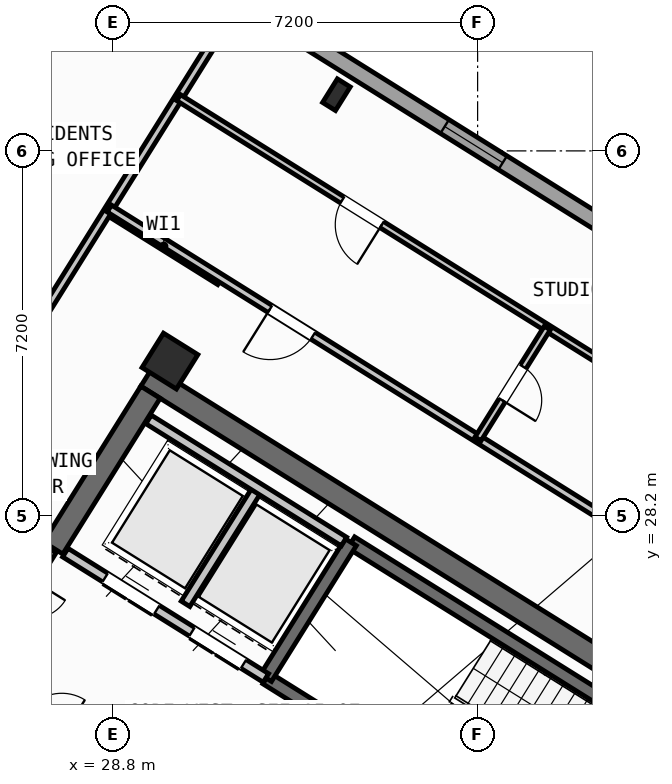
"""IFC4 building model, lengths in metres.
Left out: names, types, materials, properties, quantities, classifications, styles, units other than length and angle.
Written with IfcOpenShell. Run it as: python <this file> out.ifc"""

import sys

from ifc_helpers import new_model, si_unit, direction, frame, frame_2d, origin, origin_2d, place, context, subcontext, project, spatial, rectangle, hollow_rectangle, i_section, extrude, source, transform, mapped, element, fill, save


model = new_model("IFC4")
c1 = context("Model", 3, precision=1e-05, world=origin(), true_north=direction((0.0, 1.0)))
c2 = subcontext(c1, "Body", "Model", "MODEL_VIEW")
j1 = project(units=[si_unit("LENGTHUNIT", "METRE"), si_unit("PLANEANGLEUNIT", "RADIAN")], contexts=[c1])
p1 = place(None, origin())
s1 = spatial("IfcSite", under=j1, at=p1, CompositionType="ELEMENT")
p2 = place(p1, origin())
s2 = spatial("IfcBuilding", under=s1, at=p2, CompositionType="ELEMENT")
p3 = place(p2, frame((0.0, 0.0, 211.2)))
s3 = spatial("IfcBuildingStorey", under=s2, at=p3, CompositionType="ELEMENT", Elevation=211.2)
p4 = place(p3, frame((40.531, 24.036, 0.0), z_axis=(0.0, 0.0, 1.0), x_axis=(-0.848048787466, 0.529918157905, 0.0)))
e1 = element("IfcWall", 1, at=p4, inside=s3, PredefinedType="SHEAR", context=c2, shape_type="SweptSolid", body=[
    extrude(rectangle(XDim=13.04, YDim=0.45, at=frame_2d((6.52, 0.0))), origin(), (0.0, 0.0, 1.0), 3.35),
])
p5 = place(p3, frame((29.544, 30.636, 0.0), z_axis=(0.0, 0.0, 1.0), x_axis=(-0.529902075036, -0.848058836916, 0.0)))
e2 = element("IfcWall", 2, at=p5, inside=s3, PredefinedType="SHEAR", context=c2, shape_type="SweptSolid", body=[
    extrude(rectangle(XDim=3.625, YDim=0.45, at=frame_2d((1.812, 0.0))), origin(), (0.0, 0.0, 1.0), 3.35),
])
m1 = source(origin(), c2, "Body", "SweptSolid", [
    extrude(i_section(OverallWidth=0.3, OverallDepth=0.55, WebThickness=0.015, FlangeThickness=0.029, at=origin_2d()), origin(), (0.0, 0.0, 1.0), 3.6),
])
p6 = place(p3, frame((33.213, 36.509, 0.0), z_axis=(0.0, 0.0, 1.0), x_axis=(-0.848048096156, 0.529919264233, 0.0)))
e3 = element("IfcColumn", 3, at=p6, inside=s3, PredefinedType="COLUMN", context=c2, shape_type="MappedRepresentation", body=[
    mapped(m1, transform((0.0, 0.0, 0.0), scale=1.0)),
])
m2 = source(origin(), c2, "Body", "SweptSolid", [
    extrude(hollow_rectangle(XDim=0.8, YDim=0.8, WallThickness=0.032, at=origin_2d()), origin(), (0.0, 0.0, 1.0), 3.6),
])
p7 = place(p3, frame((29.928, 31.251, 0.0), z_axis=(0.0, 0.0, 1.0), x_axis=(-0.848048096156, 0.529919264233, 0.0)))
e4 = element("IfcColumn", 4, at=p7, inside=s3, PredefinedType="COLUMN", context=c2, shape_type="MappedRepresentation", body=[
    mapped(m2, transform((0.0, 0.0, 0.0), scale=1.0)),
])
p8 = place(p3, frame((31.76, 12.183, 0.0), z_axis=(0.0, 0.0, 1.0), x_axis=(-0.848047074256, 0.529920899612, 0.0)))
e5 = element("IfcWall", 5, at=p8, inside=s3, PredefinedType="STANDARD", context=c2, shape_type="SweptSolid", body=[
    extrude(rectangle(XDim=30.652, YDim=0.32, at=frame_2d((15.326, 0.0))), origin(), (0.0, 0.0, 1.0), 3.35),
])
p9 = place(p8, frame((15.166, 0.0, 0.0)))
e6 = element("IfcOpeningElement", 6, at=p9, cuts=e5, PredefinedType="OPENING", context=c2, shape_type="SweptSolid", body=[
    extrude(rectangle(XDim=1.2, YDim=2.15, at=frame_2d((0.6, 1.075))), frame((0.0, 0.17, 0.0), z_axis=(0.0, -1.0, 0.0), x_axis=(1.0, 0.0, 0.0)), (0.0, 0.0, 1.0), 0.34),
])
p10 = place(p8, frame((2.24, 0.0, 0.9)))
e7 = element("IfcOpeningElement", 7, at=p10, cuts=e5, PredefinedType="OPENING", context=c2, shape_type="SweptSolid", body=[
    extrude(rectangle(XDim=1.65, YDim=1.45, at=frame_2d((0.825, 0.725))), frame((0.0, 0.17, 0.0), z_axis=(0.0, -1.0, 0.0), x_axis=(1.0, 0.0, 0.0)), (0.0, 0.0, 1.0), 0.34),
])
p11 = place(p8, frame((7.469, 0.0, 0.9)))
e8 = element("IfcOpeningElement", 8, at=p11, cuts=e5, PredefinedType="OPENING", context=c2, shape_type="SweptSolid", body=[
    extrude(rectangle(XDim=1.65, YDim=1.45, at=frame_2d((0.825, 0.725))), frame((0.0, 0.17, 0.0), z_axis=(0.0, -1.0, 0.0), x_axis=(1.0, 0.0, 0.0)), (0.0, 0.0, 1.0), 0.34),
])
p12 = place(p8, frame((12.623, 0.0, 1.0)))
e9 = element("IfcOpeningElement", 9, at=p12, cuts=e5, PredefinedType="OPENING", context=c2, shape_type="SweptSolid", body=[
    extrude(rectangle(XDim=0.9, YDim=1.25, at=frame_2d((0.45, 0.625))), frame((0.0, 0.17, 0.0), z_axis=(0.0, -1.0, 0.0), x_axis=(1.0, 0.0, 0.0)), (0.0, 0.0, 1.0), 0.34),
])
p13 = place(p8, frame((19.715, 0.0, 1.0)))
e10 = element("IfcOpeningElement", 10, at=p13, cuts=e5, PredefinedType="OPENING", context=c2, shape_type="SweptSolid", body=[
    extrude(rectangle(XDim=0.9, YDim=1.25, at=frame_2d((0.45, 0.625))), frame((0.0, 0.17, 0.0), z_axis=(0.0, -1.0, 0.0), x_axis=(1.0, 0.0, 0.0)), (0.0, 0.0, 1.0), 0.34),
])
p14 = place(p8, frame((25.566, 0.0, 0.9)))
e11 = element("IfcOpeningElement", 11, at=p14, cuts=e5, PredefinedType="OPENING", context=c2, shape_type="SweptSolid", body=[
    extrude(rectangle(XDim=1.65, YDim=1.45, at=frame_2d((0.825, 0.725))), frame((0.0, 0.17, 0.0), z_axis=(0.0, -1.0, 0.0), x_axis=(1.0, 0.0, 0.0)), (0.0, 0.0, 1.0), 0.34),
])
p15 = place(p8, frame((28.896, 0.0, 1.0)))
e12 = element("IfcOpeningElement", 12, at=p15, cuts=e5, PredefinedType="OPENING", context=c2, shape_type="SweptSolid", body=[
    extrude(rectangle(XDim=0.9, YDim=1.25, at=frame_2d((0.45, 0.625))), frame((0.0, 0.17, 0.0), z_axis=(0.0, -1.0, 0.0), x_axis=(1.0, 0.0, 0.0)), (0.0, 0.0, 1.0), 0.34),
])
p16 = place(p3, frame((17.424, 47.083, 0.0), z_axis=(0.0, 0.0, 1.0), x_axis=(0.848049927979, -0.529916332693, 0.0)))
e13 = element("IfcWall", 13, at=p16, inside=s3, PredefinedType="STANDARD", context=c2, shape_type="SweptSolid", body=[
    extrude(rectangle(XDim=29.223, YDim=0.32, at=frame_2d((14.612, 0.0))), origin(), (0.0, 0.0, 1.0), 3.35),
])
p17 = place(p16, frame((2.526, 0.0, 0.0)))
e14 = element("IfcOpeningElement", 14, at=p17, cuts=e13, PredefinedType="OPENING", context=c2, shape_type="SweptSolid", body=[
    extrude(rectangle(XDim=1.05, YDim=2.15, at=frame_2d((0.525, 1.075))), frame((0.0, 0.17, 0.0), z_axis=(0.0, -1.0, 0.0), x_axis=(1.0, 0.0, 0.0)), (0.0, 0.0, 1.0), 0.34),
])
p18 = place(p16, frame((0.653, 0.0, 0.9)))
e15 = element("IfcOpeningElement", 15, at=p18, cuts=e13, PredefinedType="OPENING", context=c2, shape_type="SweptSolid", body=[
    extrude(rectangle(XDim=1.35, YDim=1.45, at=frame_2d((0.675, 0.725))), frame((0.0, 0.17, 0.0), z_axis=(0.0, -1.0, 0.0), x_axis=(1.0, 0.0, 0.0)), (0.0, 0.0, 1.0), 0.34),
])
p19 = place(p16, frame((6.897, 0.0, 1.0)))
e16 = element("IfcOpeningElement", 16, at=p19, cuts=e13, PredefinedType="OPENING", context=c2, shape_type="SweptSolid", body=[
    extrude(rectangle(XDim=0.9, YDim=1.25, at=frame_2d((0.45, 0.625))), frame((0.0, 0.17, 0.0), z_axis=(0.0, -1.0, 0.0), x_axis=(1.0, 0.0, 0.0)), (0.0, 0.0, 1.0), 0.34),
])
p20 = place(p16, frame((9.602, 0.0, 0.95)))
e17 = element("IfcOpeningElement", 17, at=p20, cuts=e13, PredefinedType="OPENING", context=c2, shape_type="SweptSolid", body=[
    extrude(rectangle(XDim=1.95, YDim=1.35, at=frame_2d((0.975, 0.675))), frame((0.0, 0.17, 0.0), z_axis=(0.0, -1.0, 0.0), x_axis=(1.0, 0.0, 0.0)), (0.0, 0.0, 1.0), 0.34),
])
p21 = place(p16, frame((14.096, 0.0, 1.0)))
e18 = element("IfcOpeningElement", 18, at=p21, cuts=e13, PredefinedType="OPENING", context=c2, shape_type="SweptSolid", body=[
    extrude(rectangle(XDim=0.9, YDim=1.25, at=frame_2d((0.45, 0.625))), frame((0.0, 0.17, 0.0), z_axis=(0.0, -1.0, 0.0), x_axis=(1.0, 0.0, 0.0)), (0.0, 0.0, 1.0), 0.34),
])
p22 = place(p16, frame((17.254, 0.0, 1.0)))
e19 = element("IfcOpeningElement", 19, at=p22, cuts=e13, PredefinedType="OPENING", context=c2, shape_type="SweptSolid", body=[
    extrude(rectangle(XDim=0.9, YDim=1.25, at=frame_2d((0.45, 0.625))), frame((0.0, 0.17, 0.0), z_axis=(0.0, -1.0, 0.0), x_axis=(1.0, 0.0, 0.0)), (0.0, 0.0, 1.0), 0.34),
])
p23 = place(p16, frame((21.139, 0.0, 0.9)))
e20 = element("IfcOpeningElement", 20, at=p23, cuts=e13, PredefinedType="OPENING", context=c2, shape_type="SweptSolid", body=[
    extrude(rectangle(XDim=1.35, YDim=1.45, at=frame_2d((0.675, 0.725))), frame((0.0, 0.17, 0.0), z_axis=(0.0, -1.0, 0.0), x_axis=(1.0, 0.0, 0.0)), (0.0, 0.0, 1.0), 0.34),
])
p24 = place(p16, frame((25.778, 0.0, 0.9)))
e21 = element("IfcOpeningElement", 21, at=p24, cuts=e13, PredefinedType="OPENING", context=c2, shape_type="SweptSolid", body=[
    extrude(rectangle(XDim=1.35, YDim=1.45, at=frame_2d((0.675, 0.725))), frame((0.0, 0.17, 0.0), z_axis=(0.0, -1.0, 0.0), x_axis=(1.0, 0.0, 0.0)), (0.0, 0.0, 1.0), 0.34),
])
p25 = place(p3, frame((39.721, 23.788, 0.0), z_axis=(0.0, 0.0, 1.0), x_axis=(-0.848054434086, 0.529909121291, 0.0)))
e22 = element("IfcWall", 22, at=p25, inside=s3, PredefinedType="SHEAR", context=c2, shape_type="SweptSolid", body=[
    extrude(rectangle(XDim=7.33, YDim=0.26, at=frame_2d((3.665, 0.0))), origin(), (0.0, 0.0, 1.0), 3.35),
])
p26 = place(p3, frame((38.046, 21.108, 0.0), z_axis=(0.0, 0.0, 1.0), x_axis=(-0.848054434086, 0.529909121291, 0.0)))
e23 = element("IfcWall", 23, at=p26, inside=s3, PredefinedType="SHEAR", context=c2, shape_type="SweptSolid", body=[
    extrude(rectangle(XDim=7.33, YDim=0.26, at=frame_2d((3.665, 0.0))), origin(), (0.0, 0.0, 1.0), 3.35),
])
p27 = place(p26, frame((0.22, 0.0, 0.0)))
e24 = element("IfcOpeningElement", 24, at=p27, cuts=e23, PredefinedType="OPENING", context=c2, shape_type="SweptSolid", body=[
    extrude(rectangle(XDim=1.1, YDim=2.1, at=frame_2d((0.55, 1.05))), frame((0.0, 0.14, 0.0), z_axis=(0.0, -1.0, 0.0), x_axis=(1.0, 0.0, 0.0)), (0.0, 0.0, 1.0), 0.28),
])
p28 = place(p3, frame((33.496, 27.677, 0.0), z_axis=(0.0, 0.0, 1.0), x_axis=(-0.529908658664, -0.84805472316, 0.0)))
e25 = element("IfcWall", 25, at=p28, inside=s3, PredefinedType="SHEAR", context=c2, shape_type="SweptSolid", body=[
    extrude(rectangle(XDim=3.16, YDim=0.26, at=frame_2d((1.58, 0.0))), origin(), (0.0, 0.0, 1.0), 3.35),
])
p29 = place(p3, frame((31.822, 24.998, 0.0), z_axis=(0.0, 0.0, 1.0), x_axis=(-0.848054125777, 0.529909614701, 0.0)))
e26 = element("IfcWall", 26, at=p29, inside=s3, PredefinedType="STANDARD", context=c2, shape_type="SweptSolid", body=[
    extrude(rectangle(XDim=4.668, YDim=0.2, at=frame_2d((2.334, 0.0))), origin(), (0.0, 0.0, 1.0), 3.34),
])
p30 = place(p29, frame((0.52, 0.0, 0.0)))
e27 = element("IfcOpeningElement", 27, at=p30, cuts=e26, PredefinedType="OPENING", context=c2, shape_type="SweptSolid", body=[
    extrude(rectangle(XDim=1.2, YDim=2.15, at=frame_2d((0.6, 1.075))), frame((0.0, 0.11, 0.0), z_axis=(0.0, -1.0, 0.0), x_axis=(1.0, 0.0, 0.0)), (0.0, 0.0, 1.0), 0.22),
])
p31 = place(p29, frame((2.54, 0.0, 0.0)))
e28 = element("IfcOpeningElement", 28, at=p31, cuts=e26, PredefinedType="OPENING", context=c2, shape_type="SweptSolid", body=[
    extrude(rectangle(XDim=1.2, YDim=2.15, at=frame_2d((0.6, 1.075))), frame((0.0, 0.11, 0.0), z_axis=(0.0, -1.0, 0.0), x_axis=(1.0, 0.0, 0.0)), (0.0, 0.0, 1.0), 0.22),
])
p32 = place(p3, frame((31.645, 28.716, 0.0), z_axis=(0.0, 0.0, 1.0), x_axis=(-0.52986693015, -0.848080795876, 0.0)))
e29 = element("IfcWall", 29, at=p32, inside=s3, PredefinedType="STANDARD", context=c2, shape_type="SweptSolid", body=[
    extrude(rectangle(XDim=2.66, YDim=0.2, at=frame_2d((1.33, 0.0))), origin(), (0.0, 0.0, 1.0), 3.34),
])
p33 = place(p3, frame((33.363, 27.69, 0.0), z_axis=(0.0, 0.0, 1.0), x_axis=(-0.84804957148, 0.529916903215, 0.0)))
e30 = element("IfcWall", 30, at=p33, inside=s3, PredefinedType="STANDARD", context=c2, shape_type="SweptSolid", body=[
    extrude(rectangle(XDim=4.548, YDim=0.2, at=frame_2d((2.274, 0.0))), origin(), (0.0, 0.0, 1.0), 3.34),
])
p34 = place(p3, frame((31.525, 21.504, 0.0), z_axis=(0.0, 0.0, 1.0), x_axis=(-0.848042066329, 0.529928913853, 0.0)))
e31 = element("IfcWall", 31, at=p34, inside=s3, PredefinedType="STANDARD", context=c2, shape_type="SweptSolid", body=[
    extrude(rectangle(XDim=6.268, YDim=0.2, at=frame_2d((3.134, 0.0))), origin(), (0.0, 0.0, 1.0), 3.34),
])
p35 = place(p34, frame((4.4, 0.0, 0.0)))
e32 = element("IfcOpeningElement", 32, at=p35, cuts=e31, PredefinedType="OPENING", context=c2, shape_type="SweptSolid", body=[
    extrude(rectangle(XDim=0.86, YDim=2.05, at=frame_2d((0.43, 1.025))), frame((0.0, 0.11, 0.0), z_axis=(0.0, -1.0, 0.0), x_axis=(1.0, 0.0, 0.0)), (0.0, 0.0, 1.0), 0.22),
])
p36 = place(p34, frame((1.45, 0.0, 0.0)))
e33 = element("IfcOpeningElement", 33, at=p36, cuts=e31, PredefinedType="OPENING", context=c2, shape_type="SweptSolid", body=[
    extrude(rectangle(XDim=0.86, YDim=2.05, at=frame_2d((0.43, 1.025))), frame((0.0, 0.11, 0.0), z_axis=(0.0, -1.0, 0.0), x_axis=(1.0, 0.0, 0.0)), (0.0, 0.0, 1.0), 0.22),
])
p37 = place(p3, frame((27.596, 27.52, 0.0), z_axis=(0.0, 0.0, 1.0), x_axis=(-0.529865479138, -0.848081702443, 0.0)))
e34 = element("IfcWall", 34, at=p37, inside=s3, PredefinedType="STANDARD", context=c2, shape_type="SweptSolid", body=[
    extrude(rectangle(XDim=2.96, YDim=0.2, at=frame_2d((1.48, 0.0))), origin(), (0.0, 0.0, 1.0), 3.34),
])
p38 = place(p37, frame((0.7, 0.0, 0.0)))
e35 = element("IfcOpeningElement", 35, at=p38, cuts=e34, PredefinedType="OPENING", context=c2, shape_type="SweptSolid", body=[
    extrude(rectangle(XDim=1.5, YDim=2.15, at=frame_2d((0.75, 1.075))), frame((0.0, 0.11, 0.0), z_axis=(0.0, -1.0, 0.0), x_axis=(1.0, 0.0, 0.0)), (0.0, 0.0, 1.0), 0.22),
])
p39 = place(p3, frame((30.914, 32.829, 0.0), z_axis=(0.0, 0.0, 1.0), x_axis=(-0.848008813643, 0.529982124211, 0.0)))
e36 = element("IfcWall", 36, at=p39, inside=s3, PredefinedType="PARTITIONING", context=c2, shape_type="SweptSolid", body=[
    extrude(rectangle(XDim=2.61, YDim=0.16, at=frame_2d((1.305, 0.0))), origin(), (0.0, 0.0, 1.0), 3.34),
])
p40 = place(p3, frame((31.239, 38.274, 0.0), z_axis=(0.0, 0.0, 1.0), x_axis=(-0.529925472745, -0.848044216616, 0.0)))
e37 = element("IfcWall", 37, at=p40, inside=s3, PredefinedType="PARTITIONING", context=c2, shape_type="SweptSolid", body=[
    extrude(rectangle(XDim=11.65, YDim=0.16, at=frame_2d((5.825, 0.0))), origin(), (0.0, 0.0, 1.0), 3.34),
])
p41 = place(p3, frame((27.73, 39.597, 0.0), z_axis=(0.0, 0.0, 1.0), x_axis=(-0.529919150083, -0.848048167486, 0.0)))
e38 = element("IfcWall", 38, at=p41, inside=s3, PredefinedType="PARTITIONING", context=c2, shape_type="SweptSolid", body=[
    extrude(rectangle(XDim=5.501, YDim=0.16, at=frame_2d((2.75, 0.0))), origin(), (0.0, 0.0, 1.0), 2.825),
])
p42 = place(p3, frame((41.936, 26.012, 0.0), z_axis=(0.0, 0.0, 1.0), x_axis=(-0.848051154596, 0.529914369676, 0.0)))
e39 = element("IfcWall", 39, at=p42, inside=s3, PredefinedType="PARTITIONING", context=c2, shape_type="SweptSolid", body=[
    extrude(rectangle(XDim=15.57, YDim=0.16, at=frame_2d((7.785, 0.0))), origin(), (0.0, 0.0, 1.0), 3.34),
])
p43 = place(p42, frame((10.83, 0.0, 0.0)))
e40 = element("IfcOpeningElement", 40, at=p43, cuts=e39, PredefinedType="OPENING", context=c2, shape_type="SweptSolid", body=[
    extrude(rectangle(XDim=1.0, YDim=2.1, at=frame_2d((0.5, 1.05))), frame((0.0, 0.09, 0.0), z_axis=(0.0, -1.0, 0.0), x_axis=(1.0, 0.0, 0.0)), (0.0, 0.0, 1.0), 0.18),
])
p44 = place(p3, frame((42.226, 28.873, 0.0), z_axis=(0.0, 0.0, 1.0), x_axis=(-0.848049134363, 0.529917602752, 0.0)))
e41 = element("IfcWall", 41, at=p44, inside=s3, PredefinedType="PLUMBINGWALL", context=c2, shape_type="SweptSolid", body=[
    extrude(rectangle(XDim=14.3, YDim=0.14, at=frame_2d((7.15, 0.0))), origin(), (0.0, 0.0, 1.0), 3.34),
])
p45 = place(p44, frame((9.57, 0.0, 0.0)))
e42 = element("IfcOpeningElement", 42, at=p45, cuts=e41, PredefinedType="OPENING", context=c2, shape_type="SweptSolid", body=[
    extrude(rectangle(XDim=0.92, YDim=2.08, at=frame_2d((0.46, 1.04))), frame((0.0, 0.08, 0.0), z_axis=(0.0, -1.0, 0.0), x_axis=(1.0, 0.0, 0.0)), (0.0, 0.0, 1.0), 0.16),
])
p46 = place(p3, frame((37.375, 31.904, 0.0), z_axis=(0.0, 0.0, 1.0), x_axis=(-0.529913878929, -0.848051461244, 0.0)))
e43 = element("IfcWall", 43, at=p46, inside=s3, PredefinedType="PLUMBINGWALL", context=c2, shape_type="SweptSolid", body=[
    extrude(rectangle(XDim=2.58, YDim=0.14, at=frame_2d((1.29, 0.0))), origin(), (0.0, 0.0, 1.0), 3.34),
])
p47 = place(p46, frame((0.9, 0.0, 0.0)))
e44 = element("IfcOpeningElement", 44, at=p47, cuts=e43, PredefinedType="OPENING", context=c2, shape_type="SweptSolid", body=[
    extrude(rectangle(XDim=0.78, YDim=2.05, at=frame_2d((0.39, 1.025))), frame((0.0, 0.08, 0.0), z_axis=(0.0, -1.0, 0.0), x_axis=(1.0, 0.0, 0.0)), (0.0, 0.0, 1.0), 0.16),
])
m3 = source(origin(), c2, "Body", "SweptSolid", [
    extrude(rectangle(XDim=1.35, YDim=1.45, at=frame_2d((0.675, 0.725))), frame((0.0, 0.03, 0.0), z_axis=(0.0, -1.0, 0.0), x_axis=(1.0, 0.0, 0.0)), (0.0, 0.0, 1.0), 0.06),
])
p48 = place(p23, origin())
e45 = element("IfcWindow", 45, at=p48, inside=s3, PartitioningType="SINGLE_PANEL", PredefinedType="WINDOW", context=c2, shape_type="MappedRepresentation", body=[
    mapped(m3, transform((0.0, 0.0, 0.0), scale=1.0)),
])
fill(e20, e45)
m4 = source(origin(), c2, "Body", "SweptSolid", [
    extrude(rectangle(XDim=1.2, YDim=2.15, at=frame_2d((0.6, 1.075))), frame((0.0, 0.025, 0.0), z_axis=(0.0, -1.0, 0.0), x_axis=(1.0, 0.0, 0.0)), (0.0, 0.0, 1.0), 0.05),
])
p49 = place(p30, origin())
e46 = element("IfcDoor", 46, at=p49, inside=s3, OperationType="DOUBLE_DOOR_SLIDING", PredefinedType="DOOR", context=c2, shape_type="MappedRepresentation", body=[
    mapped(m4, transform((0.0, 0.0, 0.0), scale=1.0)),
])
fill(e27, e46)
p50 = place(p31, origin())
e47 = element("IfcDoor", 47, at=p50, inside=s3, OperationType="DOUBLE_DOOR_SLIDING", PredefinedType="DOOR", context=c2, shape_type="MappedRepresentation", body=[
    mapped(m4, transform((0.0, 0.0, 0.0), scale=1.0)),
])
fill(e28, e47)
m5 = source(origin(), c2, "Body", "SweptSolid", [
    extrude(rectangle(XDim=1.0, YDim=2.1, at=frame_2d((0.5, 1.05))), frame((0.0, 0.025, 0.0), z_axis=(0.0, -1.0, 0.0), x_axis=(1.0, 0.0, 0.0)), (0.0, 0.0, 1.0), 0.05),
])
p51 = place(p43, origin())
e48 = element("IfcDoor", 48, at=p51, inside=s3, OperationType="SINGLE_SWING_RIGHT", PredefinedType="DOOR", context=c2, shape_type="MappedRepresentation", body=[
    mapped(m5, transform((0.0, 0.0, 0.0), scale=1.0)),
])
fill(e40, e48)
m6 = source(origin(), c2, "Body", "SweptSolid", [
    extrude(rectangle(XDim=0.92, YDim=2.08, at=frame_2d((0.46, 1.04))), frame((0.0, 0.025, 0.0), z_axis=(0.0, -1.0, 0.0), x_axis=(1.0, 0.0, 0.0)), (0.0, 0.0, 1.0), 0.05),
])
p52 = place(p45, origin())
e49 = element("IfcDoor", 49, at=p52, inside=s3, OperationType="SINGLE_SWING_LEFT", PredefinedType="DOOR", context=c2, shape_type="MappedRepresentation", body=[
    mapped(m6, transform((0.0, 0.0, 0.0), scale=1.0)),
])
fill(e42, e49)
m7 = source(origin(), c2, "Body", "SweptSolid", [
    extrude(rectangle(XDim=0.78, YDim=2.05, at=frame_2d((0.39, 1.025))), frame((0.0, 0.025, 0.0), z_axis=(0.0, -1.0, 0.0), x_axis=(1.0, 0.0, 0.0)), (0.0, 0.0, 1.0), 0.05),
])
p53 = place(p47, origin())
e50 = element("IfcDoor", 50, at=p53, inside=s3, OperationType="SINGLE_SWING_RIGHT", PredefinedType="DOOR", context=c2, shape_type="MappedRepresentation", body=[
    mapped(m7, transform((0.0, 0.0, 0.0), scale=1.0)),
])
fill(e44, e50)
save(model, sys.argv[1])
